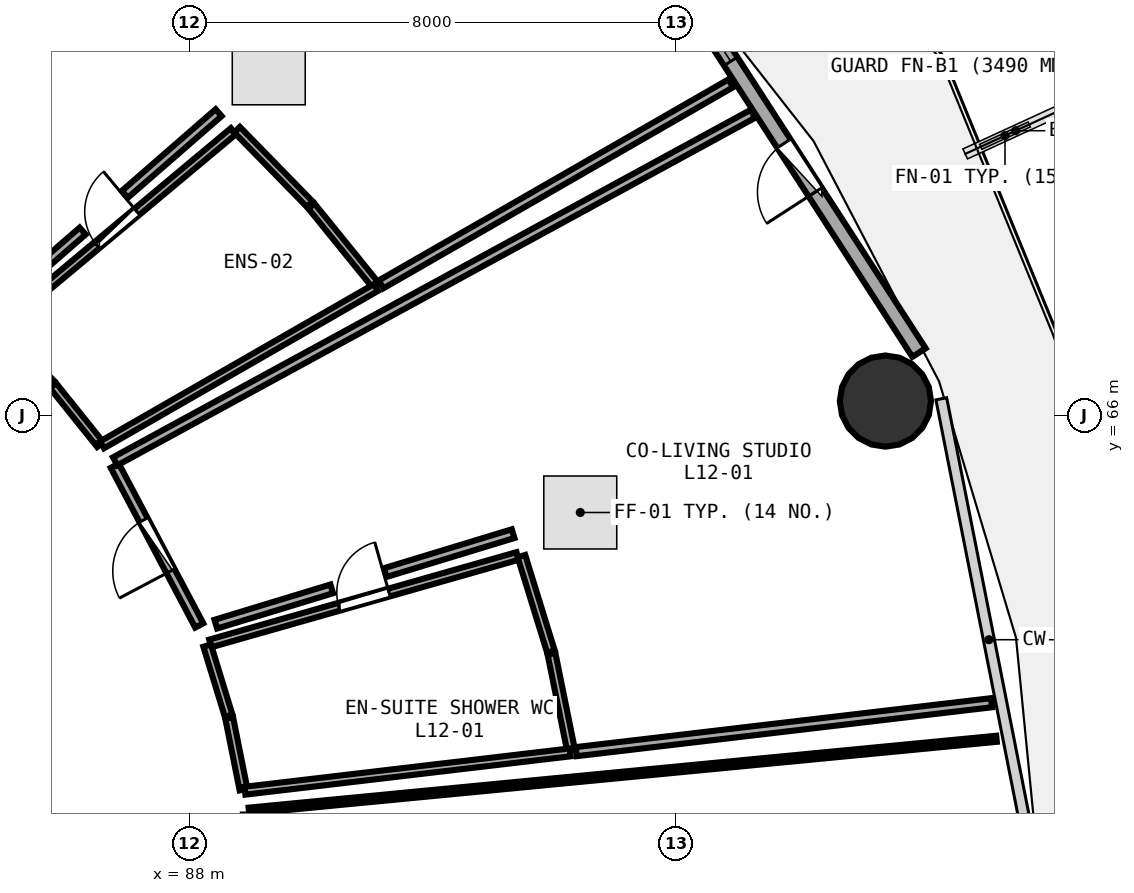
"""IFC4 building model, lengths in metres.
Left out: names, types, materials, properties, quantities, classifications, styles, units other than length and angle.
Written with IfcOpenShell. Run it as: python <this file> out.ifc"""

import sys

from ifc_helpers import new_model, si_unit, direction, frame, frame_2d, origin, origin_2d, place, context, subcontext, project, spatial, rectangle, circle, extrude, element, fill, save


model = new_model("IFC4")
c1 = context("Model", 3, precision=1e-05, world=origin(), true_north=direction((0.0, 1.0)))
c2 = subcontext(c1, "Body", "Model", "MODEL_VIEW")
j1 = project(units=[si_unit("LENGTHUNIT", "METRE"), si_unit("PLANEANGLEUNIT", "RADIAN")], contexts=[c1])
p1 = place(None, origin())
s1 = spatial("IfcSite", under=j1, at=p1, CompositionType="ELEMENT")
p2 = place(p1, origin())
s2 = spatial("IfcBuilding", under=s1, at=p2, CompositionType="ELEMENT")
p3 = place(p2, frame((0.0, 0.0, 48.75)))
s3 = spatial("IfcBuildingStorey", under=s2, at=p3, CompositionType="ELEMENT", Elevation=48.75)
p4 = place(p3, frame((99.447, 66.236, 0.0), z_axis=(0.0, 0.0, 1.0), x_axis=(1.0, 0.0, 0.0)))
e1 = element("IfcColumn", 1, at=p4, inside=s3, PredefinedType="COLUMN", context=c2, shape_type="SweptSolid", body=[
    extrude(circle(Radius=0.75, at=origin_2d()), origin(), (0.0, 0.0, 1.0), 3.75),
])
p5 = place(p3, frame((99.999, 67.033, 0.0), z_axis=(0.0, 0.0, 1.0), x_axis=(-0.543005114258, 0.839729388488, 0.0)))
e2 = element("IfcWall", 2, at=p5, inside=s3, PredefinedType="SOLIDWALL", context=c2, shape_type="SweptSolid", body=[
    extrude(rectangle(XDim=7.938, YDim=0.26, at=frame_2d((3.969, 0.0))), origin(), (0.0, 0.0, 1.0), 3.475),
])
p6 = place(p5, frame((3.144, 0.0, 0.0)))
e3 = element("IfcOpeningElement", 3, at=p6, cuts=e2, PredefinedType="OPENING", context=c2, shape_type="SweptSolid", body=[
    extrude(rectangle(XDim=0.95, YDim=2.1, at=frame_2d((0.475, 1.05))), frame((0.0, 0.14, 0.0), z_axis=(0.0, -1.0, 0.0), x_axis=(1.0, 0.0, 0.0)), (0.0, 0.0, 1.0), 0.28),
])
p7 = place(p5, frame((5.704, 0.0, 0.85)))
e4 = element("IfcOpeningElement", 4, at=p7, cuts=e2, PredefinedType="OPENING", context=c2, shape_type="SweptSolid", body=[
    extrude(rectangle(XDim=1.2, YDim=1.45, at=frame_2d((0.6, 0.725))), frame((0.0, 0.14, 0.0), z_axis=(0.0, -1.0, 0.0), x_axis=(1.0, 0.0, 0.0)), (0.0, 0.0, 1.0), 0.28),
])
p8 = place(p3, frame((88.344, 62.25, 0.0), z_axis=(0.0, 0.0, 1.0), x_axis=(0.961805744602, 0.273732916636, 0.0)))
e5 = element("IfcWall", 5, at=p8, inside=s3, PredefinedType="PLUMBINGWALL", context=c2, shape_type="SweptSolid", body=[
    extrude(rectangle(XDim=5.254, YDim=0.13, at=frame_2d((2.627, 0.0))), origin(), (0.0, 0.0, 1.0), 3.175),
])
p9 = place(p8, frame((2.197, 0.0, 0.0)))
e6 = element("IfcOpeningElement", 6, at=p9, cuts=e5, PredefinedType="OPENING", context=c2, shape_type="SweptSolid", body=[
    extrude(rectangle(XDim=0.86, YDim=2.05, at=frame_2d((0.43, 1.025))), frame((0.0, 0.075, 0.0), z_axis=(0.0, -1.0, 0.0), x_axis=(1.0, 0.0, 0.0)), (0.0, 0.0, 1.0), 0.15),
])
p10 = place(p3, frame((88.162, 62.546, 0.0), z_axis=(0.0, 0.0, 1.0), x_axis=(-0.467566881753, 0.883957697567, 0.0)))
e7 = element("IfcWall", 7, at=p10, inside=s3, PredefinedType="PARTITIONING", context=c2, shape_type="SweptSolid", body=[
    extrude(rectangle(XDim=2.972, YDim=0.15, at=frame_2d((1.486, 0.0))), origin(), (0.0, 0.0, 1.0), 2.875),
])
p11 = place(p10, frame((1.011, 0.0, 0.0)))
e8 = element("IfcOpeningElement", 8, at=p11, cuts=e7, PredefinedType="OPENING", context=c2, shape_type="SweptSolid", body=[
    extrude(rectangle(XDim=0.95, YDim=2.08, at=frame_2d((0.475, 1.04))), frame((0.0, 0.085, 0.0), z_axis=(0.0, -1.0, 0.0), x_axis=(1.0, 0.0, 0.0)), (0.0, 0.0, 1.0), 0.17),
])
p12 = place(p3, frame((84.892, 67.475, 0.0), z_axis=(0.0, 0.0, 1.0), x_axis=(0.767551433238, 0.64098736129, 0.0)))
e9 = element("IfcWall", 9, at=p12, inside=s3, PredefinedType="PLUMBINGWALL", context=c2, shape_type="SweptSolid", body=[
    extrude(rectangle(XDim=4.992, YDim=0.13, at=frame_2d((2.496, 0.0))), origin(), (0.0, 0.0, 1.0), 3.175),
])
p13 = place(p12, frame((2.066, 0.0, 0.0)))
e10 = element("IfcOpeningElement", 10, at=p13, cuts=e9, PredefinedType="OPENING", context=c2, shape_type="SweptSolid", body=[
    extrude(rectangle(XDim=0.86, YDim=2.05, at=frame_2d((0.43, 1.025))), frame((0.0, 0.075, 0.0), z_axis=(0.0, -1.0, 0.0), x_axis=(1.0, 0.0, 0.0)), (0.0, 0.0, 1.0), 0.15),
])
p14 = place(p3, frame((88.89, 59.846, 0.0), z_axis=(0.0, 0.0, 1.0), x_axis=(-0.195959765133, 0.980611936726, 0.0)))
e11 = element("IfcWall", 11, at=p14, inside=s3, PredefinedType="PLUMBINGWALL", context=c2, shape_type="SweptSolid", body=[
    extrude(rectangle(XDim=1.201, YDim=0.13, at=frame_2d((0.601, 0.0))), origin(), (0.0, 0.0, 1.0), 3.48),
])
p15 = place(p3, frame((88.645, 61.062, 0.0), z_axis=(0.0, 0.0, 1.0), x_axis=(-0.292804953119, 0.956172191307, 0.0)))
e12 = element("IfcWall", 12, at=p15, inside=s3, PredefinedType="PLUMBINGWALL", context=c2, shape_type="SweptSolid", body=[
    extrude(rectangle(XDim=1.206, YDim=0.13, at=frame_2d((0.603, 0.0))), origin(), (0.0, 0.0, 1.0), 3.48),
])
p16 = place(p3, frame((93.461, 63.686, 0.0), z_axis=(0.0, 0.0, 1.0), x_axis=(0.295079059694, -0.955472840289, 0.0)))
e13 = element("IfcWall", 13, at=p16, inside=s3, PredefinedType="PLUMBINGWALL", context=c2, shape_type="SweptSolid", body=[
    extrude(rectangle(XDim=1.641, YDim=0.13, at=frame_2d((0.82, 0.0))), origin(), (0.0, 0.0, 1.0), 3.48),
])
p17 = place(p3, frame((93.955, 62.079, 0.0), z_axis=(0.0, 0.0, 1.0), x_axis=(0.198619685617, -0.980076640108, 0.0)))
e14 = element("IfcWall", 14, at=p17, inside=s3, PredefinedType="PLUMBINGWALL", context=c2, shape_type="SweptSolid", body=[
    extrude(rectangle(XDim=1.631, YDim=0.13, at=frame_2d((0.815, 0.0))), origin(), (0.0, 0.0, 1.0), 3.48),
])
p18 = place(p3, frame((94.263, 60.459, 0.0), z_axis=(0.0, 0.0, 1.0), x_axis=(-0.993128310231, -0.117030591804, 0.0)))
e15 = element("IfcWall", 15, at=p18, inside=s3, PredefinedType="PLUMBINGWALL", context=c2, shape_type="SweptSolid", body=[
    extrude(rectangle(XDim=5.386, YDim=0.13, at=frame_2d((2.693, 0.0))), origin(), (0.0, 0.0, 1.0), 3.175),
])
p19 = place(p3, frame((86.779, 65.245, 0.0), z_axis=(0.0, 0.0, 1.0), x_axis=(0.878114235828, 0.478451030761, 0.0)))
e16 = element("IfcWall", 16, at=p19, inside=s3, PredefinedType="PARTITIONING", context=c2, shape_type="SweptSolid", body=[
    extrude(rectangle(XDim=11.942, YDim=0.15, at=frame_2d((5.971, 0.0))), origin(), (0.0, 0.0, 1.0), 2.875),
])
p20 = place(p3, frame((101.192, 61.275, 0.0), z_axis=(0.0, 0.0, 1.0), x_axis=(-0.993130233211, -0.117014272133, 0.0)))
e17 = element("IfcWall", 17, at=p20, inside=s3, PredefinedType="PARTITIONING", context=c2, shape_type="SweptSolid", body=[
    extrude(rectangle(XDim=6.877, YDim=0.15, at=frame_2d((3.438, 0.0))), origin(), (0.0, 0.0, 1.0), 2.875),
])
p21 = place(p3, frame((93.324, 64.055, 0.0), z_axis=(0.0, 0.0, 1.0), x_axis=(-0.956656385618, -0.291219092533, 0.0)))
e18 = element("IfcWall", 18, at=p21, inside=s3, PredefinedType="PARTITIONING", context=c2, shape_type="SweptSolid", body=[
    extrude(rectangle(XDim=2.197, YDim=0.15, at=frame_2d((1.099, 0.0))), origin(), (0.0, 0.0, 1.0), 3.175),
])
p22 = place(p3, frame((90.341, 63.148, 0.0), z_axis=(0.0, 0.0, 1.0), x_axis=(-0.956672396934, -0.291166490078, 0.0)))
e19 = element("IfcWall", 19, at=p22, inside=s3, PredefinedType="PARTITIONING", context=c2, shape_type="SweptSolid", body=[
    extrude(rectangle(XDim=1.993, YDim=0.15, at=frame_2d((0.997, 0.0))), origin(), (0.0, 0.0, 1.0), 3.235),
])
p23 = place(p3, frame((86.533, 65.521, 0.0), z_axis=(0.0, 0.0, 1.0), x_axis=(-0.625509784914, 0.780216321912, 0.0)))
e20 = element("IfcWall", 20, at=p23, inside=s3, PredefinedType="PLUMBINGWALL", context=c2, shape_type="SweptSolid", body=[
    extrude(rectangle(XDim=1.242, YDim=0.13, at=frame_2d((0.621, 0.0))), origin(), (0.0, 0.0, 1.0), 2.875),
])
p24 = place(p3, frame((85.73, 66.521, 0.0), z_axis=(0.0, 0.0, 1.0), x_axis=(-0.694622338853, 0.719374593913, 0.0)))
e21 = element("IfcWall", 21, at=p24, inside=s3, PredefinedType="PLUMBINGWALL", context=c2, shape_type="SweptSolid", body=[
    extrude(rectangle(XDim=1.253, YDim=0.13, at=frame_2d((0.626, 0.0))), origin(), (0.0, 0.0, 1.0), 2.875),
])
p25 = place(p3, frame((88.784, 70.699, 0.0), z_axis=(0.0, 0.0, 1.0), x_axis=(0.698493231478, -0.715616661055, 0.0)))
e22 = element("IfcWall", 22, at=p25, inside=s3, PredefinedType="PLUMBINGWALL", context=c2, shape_type="SweptSolid", body=[
    extrude(rectangle(XDim=1.711, YDim=0.13, at=frame_2d((0.855, 0.0))), origin(), (0.0, 0.0, 1.0), 2.875),
])
p26 = place(p3, frame((90.006, 69.445, 0.0), z_axis=(0.0, 0.0, 1.0), x_axis=(0.629707963092, -0.776831951723, 0.0)))
e23 = element("IfcWall", 23, at=p26, inside=s3, PredefinedType="PLUMBINGWALL", context=c2, shape_type="SweptSolid", body=[
    extrude(rectangle(XDim=1.694, YDim=0.13, at=frame_2d((0.847, 0.0))), origin(), (0.0, 0.0, 1.0), 3.175),
])
p27 = place(p3, frame((91.068, 68.103, 0.0), z_axis=(0.0, 0.0, 1.0), x_axis=(-0.867165143158, -0.498020696851, 0.0)))
e24 = element("IfcWall", 24, at=p27, inside=s3, PredefinedType="PLUMBINGWALL", context=c2, shape_type="SweptSolid", body=[
    extrude(rectangle(XDim=5.194, YDim=0.13, at=frame_2d((2.597, 0.0))), origin(), (0.0, 0.0, 1.0), 2.875),
])
p28 = place(p3, frame((82.049, 69.557, 0.0), z_axis=(0.0, 0.0, 1.0), x_axis=(0.586718941426, 0.809790641939, 0.0)))
e25 = element("IfcWall", 25, at=p28, inside=s3, PredefinedType="PARTITIONING", context=c2, shape_type="SweptSolid", body=[
    extrude(rectangle(XDim=11.249, YDim=0.15, at=frame_2d((5.625, 0.0))), origin(), (0.0, 0.0, 1.0), 2.875),
])
p29 = place(p3, frame((96.903, 71.461, 0.0), z_axis=(0.0, 0.0, 1.0), x_axis=(-0.866924194656, -0.498440007142, 0.0)))
e26 = element("IfcWall", 26, at=p29, inside=s3, PredefinedType="PARTITIONING", context=c2, shape_type="SweptSolid", body=[
    extrude(rectangle(XDim=6.634, YDim=0.15, at=frame_2d((3.317, 0.0))), origin(), (0.0, 0.0, 1.0), 2.875),
])
p30 = place(p3, frame((88.481, 70.979, 0.0), z_axis=(0.0, 0.0, 1.0), x_axis=(-0.754356172394, -0.656465357176, 0.0)))
e27 = element("IfcWall", 27, at=p30, inside=s3, PredefinedType="PARTITIONING", context=c2, shape_type="SweptSolid", body=[
    extrude(rectangle(XDim=2.045, YDim=0.15, at=frame_2d((1.022, 0.0))), origin(), (0.0, 0.0, 1.0), 3.175),
])
p31 = place(p3, frame((86.244, 69.032, 0.0), z_axis=(0.0, 0.0, 1.0), x_axis=(-0.754351792987, -0.656470389597, 0.0)))
e28 = element("IfcWall", 28, at=p31, inside=s3, PredefinedType="PARTITIONING", context=c2, shape_type="SweptSolid", body=[
    extrude(rectangle(XDim=2.093, YDim=0.15, at=frame_2d((1.046, 0.0))), origin(), (0.0, 0.0, 1.0), 3.235),
])
p32 = place(p3, frame((88.979, 59.5, 0.0), z_axis=(0.0, 0.0, 1.0), x_axis=(0.995408087514, 0.095722198638, 0.0)))
e29 = element("IfcWall", 29, at=p32, inside=s3, PredefinedType="PARTITIONING", context=c2, shape_type="SweptSolid", body=[
    extrude(rectangle(XDim=12.352, YDim=0.1, at=frame_2d((6.176, 0.0))), origin(), (0.0, 0.0, 1.0), 2.875),
])
p33 = place(p6, frame((0.95, 0.0, 0.0), z_axis=(0.0, 0.0, 1.0), x_axis=(-1.0, 0.0, 0.0)))
e30 = element("IfcDoor", 30, at=p33, inside=s3, OperationType="SINGLE_SWING_RIGHT", PredefinedType="DOOR", context=c2, shape_type="SweptSolid", body=[
    extrude(rectangle(XDim=0.95, YDim=2.1, at=frame_2d((0.475, 1.05))), frame((0.0, 0.025, 0.0), z_axis=(0.0, -1.0, 0.0), x_axis=(1.0, 0.0, 0.0)), (0.0, 0.0, 1.0), 0.05),
])
fill(e3, e30)
p34 = place(p7, origin())
e31 = element("IfcWindow", 31, at=p34, inside=s3, PartitioningType="SINGLE_PANEL", PredefinedType="WINDOW", context=c2, shape_type="SweptSolid", body=[
    extrude(rectangle(XDim=1.2, YDim=1.45, at=frame_2d((0.6, 0.725))), frame((0.0, 0.03, 0.0), z_axis=(0.0, -1.0, 0.0), x_axis=(1.0, 0.0, 0.0)), (0.0, 0.0, 1.0), 0.06),
])
fill(e4, e31)
p35 = place(p9, origin())
e32 = element("IfcDoor", 32, at=p35, inside=s3, OperationType="SINGLE_SWING_RIGHT", PredefinedType="DOOR", context=c2, shape_type="SweptSolid", body=[
    extrude(rectangle(XDim=0.86, YDim=2.05, at=frame_2d((0.43, 1.025))), frame((0.0, 0.025, 0.0), z_axis=(0.0, -1.0, 0.0), x_axis=(1.0, 0.0, 0.0)), (0.0, 0.0, 1.0), 0.05),
])
fill(e6, e32)
p36 = place(p11, origin())
e33 = element("IfcDoor", 33, at=p36, inside=s3, OperationType="SINGLE_SWING_LEFT", PredefinedType="DOOR", context=c2, shape_type="SweptSolid", body=[
    extrude(rectangle(XDim=0.95, YDim=2.08, at=frame_2d((0.475, 1.04))), frame((0.0, 0.025, 0.0), z_axis=(0.0, -1.0, 0.0), x_axis=(1.0, 0.0, 0.0)), (0.0, 0.0, 1.0), 0.05),
])
fill(e8, e33)
p37 = place(p13, origin())
e34 = element("IfcDoor", 34, at=p37, inside=s3, OperationType="SINGLE_SWING_RIGHT", PredefinedType="DOOR", context=c2, shape_type="SweptSolid", body=[
    extrude(rectangle(XDim=0.86, YDim=2.05, at=frame_2d((0.43, 1.025))), frame((0.0, 0.025, 0.0), z_axis=(0.0, -1.0, 0.0), x_axis=(1.0, 0.0, 0.0)), (0.0, 0.0, 1.0), 0.05),
])
fill(e10, e34)
save(model, sys.argv[1])
